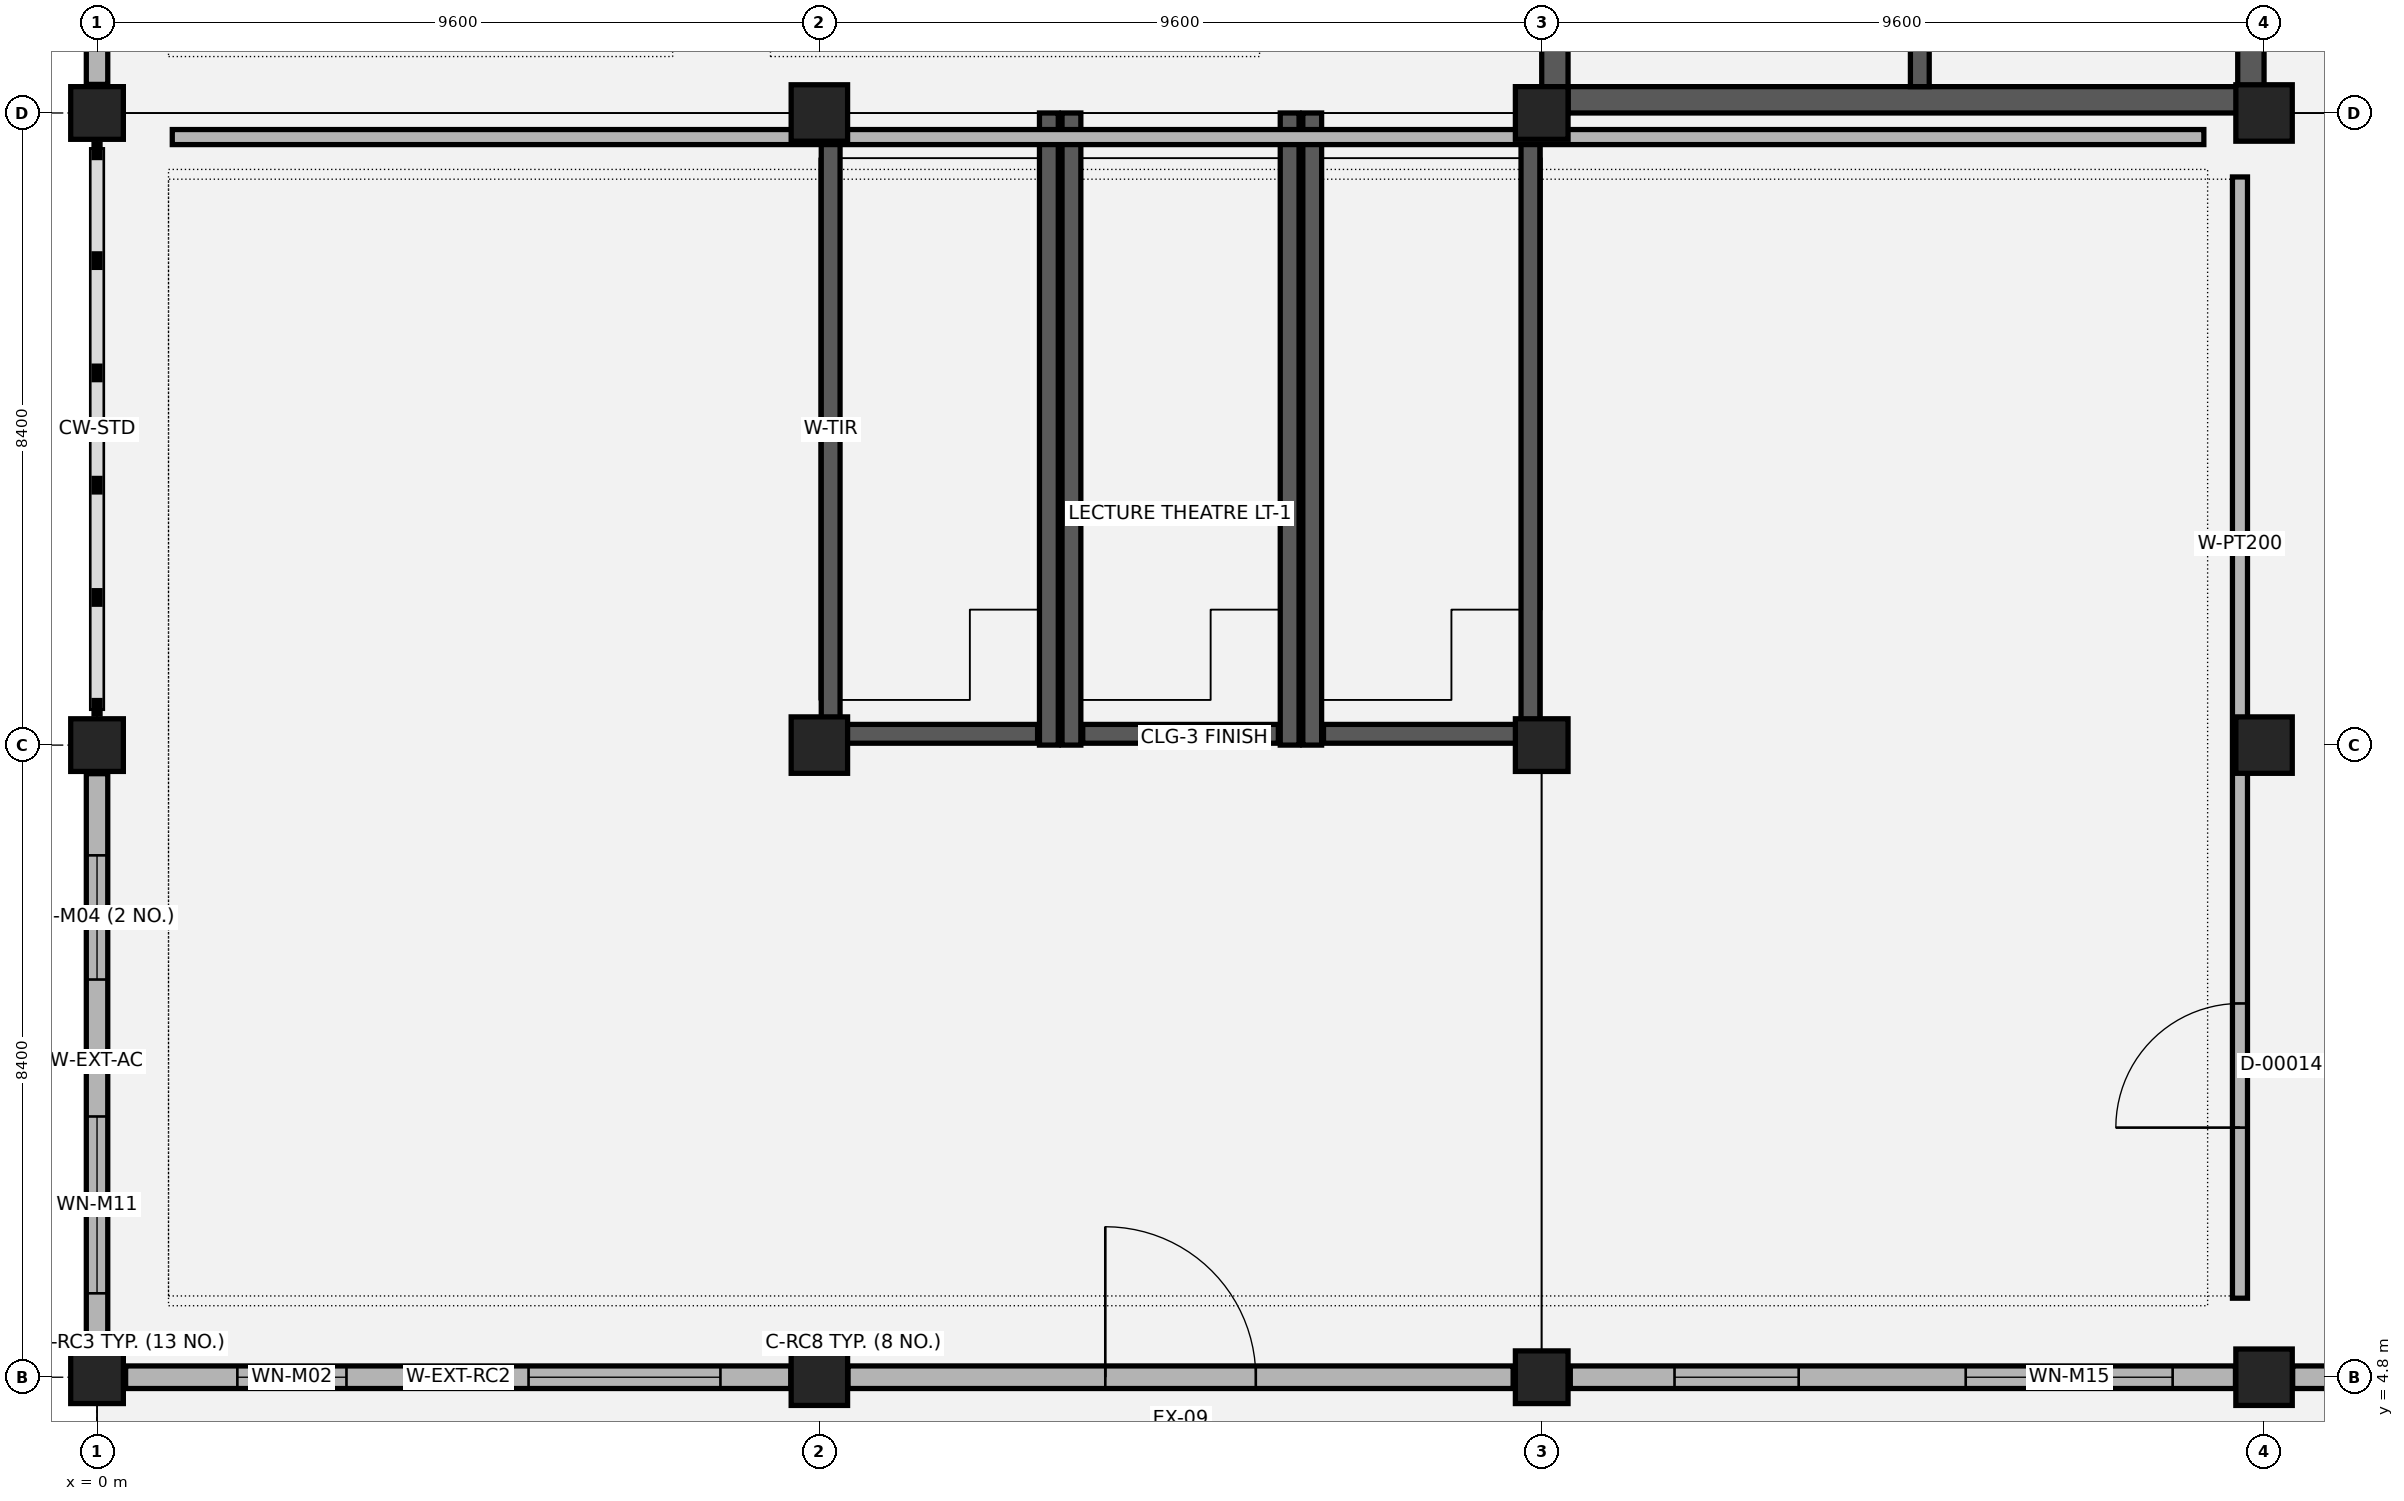
"""IFC4 building model, lengths in metres.
Left out: names, types, materials, properties, quantities, classifications, styles, units other than length and angle.
Written with IfcOpenShell. Run it as: python <this file> out.ifc"""

import sys

from ifc_helpers import new_model, si_unit, direction, frame, frame_2d, origin, origin_2d, place, context, subcontext, project, spatial, rectangle, extrude, element, fill, save


model = new_model("IFC4")
c1 = context("Model", 3, precision=1e-05, world=origin(), true_north=direction((0.0, 1.0)))
c2 = subcontext(c1, "Body", "Model", "MODEL_VIEW")
j1 = project(units=[si_unit("LENGTHUNIT", "METRE"), si_unit("PLANEANGLEUNIT", "RADIAN")], contexts=[c1])
p1 = place(None, origin())
s1 = spatial("IfcSite", under=j1, at=p1, CompositionType="ELEMENT")
p2 = place(p1, origin())
s2 = spatial("IfcBuilding", under=s1, at=p2, CompositionType="ELEMENT")
p3 = place(p2, origin())
s3 = spatial("IfcBuildingStorey", under=s2, at=p3, CompositionType="ELEMENT", Elevation=0.0)
for number, where, z_axis, x_axis in (
    (1, (0.0, 4.8, 0.0), (0.0, 0.0, 1.0), (1.0, 0.0, 0.0)),
    (2, (0.0, 13.2, 0.0), (0.0, 0.0, 1.0), (1.0, 0.0, 0.0)),
    (3, (0.0, 21.6, 0.0), (0.0, 0.0, 1.0), (1.0, 0.0, 0.0)),
):
    element("IfcColumn", number, at=place(p3, frame(where, z_axis=z_axis, x_axis=x_axis)), inside=s3, PredefinedType="COLUMN", context=c2, shape_type="SweptSolid", body=[
        extrude(rectangle(XDim=0.7, YDim=0.7, at=origin_2d()), origin(), (0.0, 0.0, 1.0), 5.4),
    ])
for number, where, z_axis, x_axis in (
    (4, (9.6, 4.8, 0.0), (0.0, 0.0, 1.0), (1.0, 0.0, 0.0)),
    (5, (9.6, 13.2, 0.0), (0.0, 0.0, 1.0), (1.0, 0.0, 0.0)),
    (6, (9.6, 21.6, 0.0), (0.0, 0.0, 1.0), (1.0, 0.0, 0.0)),
):
    element("IfcColumn", number, at=place(p3, frame(where, z_axis=z_axis, x_axis=x_axis)), inside=s3, PredefinedType="COLUMN", context=c2, shape_type="SweptSolid", body=[
        extrude(rectangle(XDim=0.75, YDim=0.75, at=origin_2d()), origin(), (0.0, 0.0, 1.0), 5.4),
    ])
for number, where, z_axis, x_axis in (
    (7, (19.2, 4.8, 0.0), (0.0, 0.0, 1.0), (1.0, 0.0, 0.0)),
    (8, (19.2, 13.2, 0.0), (0.0, 0.0, 1.0), (1.0, 0.0, 0.0)),
    (9, (19.2, 21.6, 0.0), (0.0, 0.0, 1.0), (1.0, 0.0, 0.0)),
):
    element("IfcColumn", number, at=place(p3, frame(where, z_axis=z_axis, x_axis=x_axis)), inside=s3, PredefinedType="COLUMN", context=c2, shape_type="SweptSolid", body=[
        extrude(rectangle(XDim=0.7, YDim=0.7, at=origin_2d()), origin(), (0.0, 0.0, 1.0), 5.4),
    ])
for number, where, z_axis, x_axis in (
    (10, (28.8, 4.8, 0.0), (0.0, 0.0, 1.0), (1.0, 0.0, 0.0)),
    (11, (28.8, 13.2, 0.0), (0.0, 0.0, 1.0), (1.0, 0.0, 0.0)),
    (12, (28.8, 21.6, 0.0), (0.0, 0.0, 1.0), (1.0, 0.0, 0.0)),
):
    element("IfcColumn", number, at=place(p3, frame(where, z_axis=z_axis, x_axis=x_axis)), inside=s3, PredefinedType="COLUMN", context=c2, shape_type="SweptSolid", body=[
        extrude(rectangle(XDim=0.75, YDim=0.75, at=origin_2d()), origin(), (0.0, 0.0, 1.0), 5.4),
    ])
for number, where, z_axis, x_axis in (
    (13, (9.75, 13.2, 0.0), (0.0, 0.0, 1.0), (0.0, 1.0, 0.0)),
    (14, (12.65, 13.2, 0.0), (0.0, 0.0, 1.0), (0.0, 1.0, 0.0)),
):
    element("IfcWall", number, at=place(p3, frame(where, z_axis=z_axis, x_axis=x_axis)), inside=s3, PredefinedType="SHEAR", context=c2, shape_type="SweptSolid", body=[
        extrude(rectangle(XDim=8.4, YDim=0.25, at=frame_2d((4.2, 0.0))), origin(), (0.0, 0.0, 1.0), 0.4),
    ])
p4 = place(p3, frame((9.9, 13.35, 0.0), z_axis=(0.0, 0.0, 1.0), x_axis=(1.0, 0.0, 0.0)))
e15 = element("IfcWall", 15, at=p4, inside=s3, PredefinedType="SHEAR", context=c2, shape_type="SweptSolid", body=[
    extrude(rectangle(XDim=2.6, YDim=0.25, at=frame_2d((1.3, 0.0))), origin(), (0.0, 0.0, 1.0), 0.4),
])
for number, where, z_axis, x_axis in (
    (16, (12.95, 13.2, 0.0), (0.0, 0.0, 1.0), (0.0, 1.0, 0.0)),
    (17, (15.85, 13.2, 0.0), (0.0, 0.0, 1.0), (0.0, 1.0, 0.0)),
):
    element("IfcWall", number, at=place(p3, frame(where, z_axis=z_axis, x_axis=x_axis)), inside=s3, PredefinedType="SHEAR", context=c2, shape_type="SweptSolid", body=[
        extrude(rectangle(XDim=8.4, YDim=0.25, at=frame_2d((4.2, 0.0))), origin(), (0.0, 0.0, 1.0), 1.0),
    ])
p5 = place(p3, frame((13.1, 13.35, 0.0), z_axis=(0.0, 0.0, 1.0), x_axis=(1.0, 0.0, 0.0)))
e18 = element("IfcWall", 18, at=p5, inside=s3, PredefinedType="SHEAR", context=c2, shape_type="SweptSolid", body=[
    extrude(rectangle(XDim=2.6, YDim=0.25, at=frame_2d((1.3, 0.0))), origin(), (0.0, 0.0, 1.0), 1.0),
])
for number, where, z_axis, x_axis in (
    (19, (16.15, 13.2, 0.0), (0.0, 0.0, 1.0), (0.0, 1.0, 0.0)),
    (20, (19.05, 13.2, 0.0), (0.0, 0.0, 1.0), (0.0, 1.0, 0.0)),
):
    element("IfcWall", number, at=place(p3, frame(where, z_axis=z_axis, x_axis=x_axis)), inside=s3, PredefinedType="SHEAR", context=c2, shape_type="SweptSolid", body=[
        extrude(rectangle(XDim=8.4, YDim=0.25, at=frame_2d((4.2, 0.0))), origin(), (0.0, 0.0, 1.0), 1.6),
    ])
p6 = place(p3, frame((16.3, 13.35, 0.0), z_axis=(0.0, 0.0, 1.0), x_axis=(1.0, 0.0, 0.0)))
e21 = element("IfcWall", 21, at=p6, inside=s3, PredefinedType="SHEAR", context=c2, shape_type="SweptSolid", body=[
    extrude(rectangle(XDim=2.6, YDim=0.25, at=frame_2d((1.3, 0.0))), origin(), (0.0, 0.0, 1.0), 1.6),
])
p7 = place(p3, frame((0.0, 12.82, 0.0), z_axis=(0.0, 0.0, 1.0), x_axis=(0.0, -1.0, 0.0)))
e22 = element("IfcWall", 22, at=p7, inside=s3, PredefinedType="SOLIDWALL", context=c2, shape_type="SweptSolid", body=[
    extrude(rectangle(XDim=7.64, YDim=0.285, at=frame_2d((3.82, 0.0))), origin(), (0.0, 0.0, 1.0), 4.04),
])
p8 = place(p7, frame((1.085, 0.0, 0.9)))
e23 = element("IfcOpeningElement", 23, at=p8, cuts=e22, PredefinedType="OPENING", context=c2, shape_type="SweptSolid", body=[
    extrude(rectangle(XDim=1.65, YDim=1.5, at=frame_2d((0.825, 0.75))), frame((0.0, 0.152, 0.0), z_axis=(0.0, -1.0, 0.0), x_axis=(1.0, 0.0, 0.0)), (0.0, 0.0, 1.0), 0.305),
])
p9 = place(p7, frame((4.555, 0.0, 0.9)))
e24 = element("IfcOpeningElement", 24, at=p9, cuts=e22, PredefinedType="OPENING", context=c2, shape_type="SweptSolid", body=[
    extrude(rectangle(XDim=2.35, YDim=1.7, at=frame_2d((1.175, 0.85))), frame((0.0, 0.152, 0.0), z_axis=(0.0, -1.0, 0.0), x_axis=(1.0, 0.0, 0.0)), (0.0, 0.0, 1.0), 0.305),
])
p10 = place(p3, frame((0.0, 29.62, 0.0), z_axis=(0.0, 0.0, 1.0), x_axis=(0.0, -1.0, 0.0)))
e25 = element("IfcWall", 25, at=p10, inside=s3, PredefinedType="SOLIDWALL", context=c2, shape_type="SweptSolid", body=[
    extrude(rectangle(XDim=7.64, YDim=0.285, at=frame_2d((3.82, 0.0))), origin(), (0.0, 0.0, 1.0), 4.04),
])
p11 = place(p10, frame((2.82, 0.0, 0.0)))
e26 = element("IfcOpeningElement", 26, at=p11, cuts=e25, PredefinedType="OPENING", context=c2, shape_type="SweptSolid", body=[
    extrude(rectangle(XDim=2.0, YDim=2.2, at=frame_2d((1.0, 1.1))), frame((0.0, 0.152, 0.0), z_axis=(0.0, -1.0, 0.0), x_axis=(1.0, 0.0, 0.0)), (0.0, 0.0, 1.0), 0.305),
])
p12 = place(p3, frame((0.38, 4.8, 0.0), z_axis=(0.0, 0.0, 1.0), x_axis=(1.0, 0.0, 0.0)))
e27 = element("IfcWall", 27, at=p12, inside=s3, PredefinedType="SOLIDWALL", context=c2, shape_type="SweptSolid", body=[
    extrude(rectangle(XDim=8.84, YDim=0.3, at=frame_2d((4.42, 0.0))), origin(), (0.0, 0.0, 1.0), 4.04),
])
p13 = place(p12, frame((1.485, 0.0, 0.9)))
e28 = element("IfcOpeningElement", 28, at=p13, cuts=e27, PredefinedType="OPENING", context=c2, shape_type="SweptSolid", body=[
    extrude(rectangle(XDim=1.45, YDim=1.45, at=frame_2d((0.725, 0.725))), frame((0.0, 0.16, 0.0), z_axis=(0.0, -1.0, 0.0), x_axis=(1.0, 0.0, 0.0)), (0.0, 0.0, 1.0), 0.32),
])
p14 = place(p12, frame((5.355, 0.0, 0.9)))
e29 = element("IfcOpeningElement", 29, at=p14, cuts=e27, PredefinedType="OPENING", context=c2, shape_type="SweptSolid", body=[
    extrude(rectangle(XDim=2.55, YDim=1.75, at=frame_2d((1.275, 0.875))), frame((0.0, 0.16, 0.0), z_axis=(0.0, -1.0, 0.0), x_axis=(1.0, 0.0, 0.0)), (0.0, 0.0, 1.0), 0.32),
])
p15 = place(p3, frame((9.98, 4.8, 0.0), z_axis=(0.0, 0.0, 1.0), x_axis=(1.0, 0.0, 0.0)))
e30 = element("IfcWall", 30, at=p15, inside=s3, PredefinedType="SOLIDWALL", context=c2, shape_type="SweptSolid", body=[
    extrude(rectangle(XDim=8.84, YDim=0.3, at=frame_2d((4.42, 0.0))), origin(), (0.0, 0.0, 1.0), 4.04),
])
p16 = place(p15, frame((3.42, 0.0, 0.0)))
e31 = element("IfcOpeningElement", 31, at=p16, cuts=e30, PredefinedType="OPENING", context=c2, shape_type="SweptSolid", body=[
    extrude(rectangle(XDim=2.0, YDim=2.2, at=frame_2d((1.0, 1.1))), frame((0.0, 0.16, 0.0), z_axis=(0.0, -1.0, 0.0), x_axis=(1.0, 0.0, 0.0)), (0.0, 0.0, 1.0), 0.32),
])
p17 = place(p3, frame((19.58, 4.8, 0.0), z_axis=(0.0, 0.0, 1.0), x_axis=(1.0, 0.0, 0.0)))
e32 = element("IfcWall", 32, at=p17, inside=s3, PredefinedType="SOLIDWALL", context=c2, shape_type="SweptSolid", body=[
    extrude(rectangle(XDim=8.84, YDim=0.3, at=frame_2d((4.42, 0.0))), origin(), (0.0, 0.0, 1.0), 4.04),
])
p18 = place(p17, frame((1.385, 0.0, 0.9)))
e33 = element("IfcOpeningElement", 33, at=p18, cuts=e32, PredefinedType="OPENING", context=c2, shape_type="SweptSolid", body=[
    extrude(rectangle(XDim=1.65, YDim=1.5, at=frame_2d((0.825, 0.75))), frame((0.0, 0.16, 0.0), z_axis=(0.0, -1.0, 0.0), x_axis=(1.0, 0.0, 0.0)), (0.0, 0.0, 1.0), 0.32),
])
p19 = place(p17, frame((5.255, 0.0, 0.9)))
e34 = element("IfcOpeningElement", 34, at=p19, cuts=e32, PredefinedType="OPENING", context=c2, shape_type="SweptSolid", body=[
    extrude(rectangle(XDim=2.75, YDim=1.8, at=frame_2d((1.375, 0.9))), frame((0.0, 0.16, 0.0), z_axis=(0.0, -1.0, 0.0), x_axis=(1.0, 0.0, 0.0)), (0.0, 0.0, 1.0), 0.32),
])
p20 = place(p3, frame((29.18, 4.8, 0.0), z_axis=(0.0, 0.0, 1.0), x_axis=(1.0, 0.0, 0.0)))
e35 = element("IfcWall", 35, at=p20, inside=s3, PredefinedType="SOLIDWALL", context=c2, shape_type="SweptSolid", body=[
    extrude(rectangle(XDim=8.84, YDim=0.3, at=frame_2d((4.42, 0.0))), origin(), (0.0, 0.0, 1.0), 4.04),
])
p21 = place(p20, frame((3.37, 0.0, 0.0)))
e36 = element("IfcOpeningElement", 36, at=p21, cuts=e35, PredefinedType="OPENING", context=c2, shape_type="SweptSolid", body=[
    extrude(rectangle(XDim=2.1, YDim=2.2, at=frame_2d((1.05, 1.1))), frame((0.0, 0.16, 0.0), z_axis=(0.0, -1.0, 0.0), x_axis=(1.0, 0.0, 0.0)), (0.0, 0.0, 1.0), 0.32),
])
p22 = place(p3, frame((19.2, 21.775, 0.0), z_axis=(0.0, 0.0, 1.0), x_axis=(1.0, 0.0, 0.0)))
e37 = element("IfcWall", 37, at=p22, inside=s3, PredefinedType="SHEAR", context=c2, shape_type="SweptSolid", body=[
    extrude(rectangle(XDim=9.6, YDim=0.35, at=frame_2d((4.8, 0.0))), origin(), (0.0, 0.0, 1.0), 5.11),
])
p23 = place(p3, frame((19.375, 21.6, 0.0), z_axis=(0.0, 0.0, 1.0), x_axis=(0.0, 1.0, 0.0)))
e38 = element("IfcWall", 38, at=p23, inside=s3, PredefinedType="SHEAR", context=c2, shape_type="SweptSolid", body=[
    extrude(rectangle(XDim=8.4, YDim=0.35, at=frame_2d((4.2, 0.0))), origin(), (0.0, 0.0, 1.0), 5.11),
])
p24 = place(p3, frame((28.625, 21.6, 0.0), z_axis=(0.0, 0.0, 1.0), x_axis=(0.0, 1.0, 0.0)))
e39 = element("IfcWall", 39, at=p24, inside=s3, PredefinedType="SHEAR", context=c2, shape_type="SweptSolid", body=[
    extrude(rectangle(XDim=8.4, YDim=0.35, at=frame_2d((4.2, 0.0))), origin(), (0.0, 0.0, 1.0), 5.11),
])
p25 = place(p24, frame((5.3, 0.0, 0.0)))
e40 = element("IfcOpeningElement", 40, at=p25, cuts=e39, PredefinedType="OPENING", context=c2, shape_type="SweptSolid", body=[
    extrude(rectangle(XDim=1.4, YDim=2.15, at=frame_2d((0.7, 1.075))), frame((0.0, 0.185, 0.0), z_axis=(0.0, -1.0, 0.0), x_axis=(1.0, 0.0, 0.0)), (0.0, 0.0, 1.0), 0.37),
])
p26 = place(p3, frame((24.225, 29.65, 0.0), z_axis=(0.0, 0.0, 1.0), x_axis=(0.0, -1.0, 0.0)))
e41 = element("IfcWall", 41, at=p26, inside=s3, PredefinedType="SHEAR", context=c2, shape_type="SweptSolid", body=[
    extrude(rectangle(XDim=7.7, YDim=0.25, at=frame_2d((3.85, 0.0))), origin(), (0.0, 0.0, 1.0), 5.11),
])
p27 = place(p26, frame((0.45, 0.0, 0.0)))
e42 = element("IfcOpeningElement", 42, at=p27, cuts=e41, PredefinedType="OPENING", context=c2, shape_type="SweptSolid", body=[
    extrude(rectangle(XDim=1.25, YDim=2.15, at=frame_2d((0.625, 1.075))), frame((0.0, 0.135, 0.0), z_axis=(0.0, -1.0, 0.0), x_axis=(1.0, 0.0, 0.0)), (0.0, 0.0, 1.0), 0.27),
])
p28 = place(p3, frame((28.48, 5.85, 0.0), z_axis=(0.0, 0.0, 1.0), x_axis=(0.0, 1.0, 0.0)))
e43 = element("IfcWall", 43, at=p28, inside=s3, PredefinedType="PARTITIONING", context=c2, shape_type="SweptSolid", body=[
    extrude(rectangle(XDim=14.9, YDim=0.2, at=frame_2d((7.45, 0.0))), origin(), (0.0, 0.0, 1.0), 4.04),
])
p29 = place(p28, frame((2.267, 0.0, 0.0)))
e44 = element("IfcOpeningElement", 44, at=p29, cuts=e43, PredefinedType="OPENING", context=c2, shape_type="SweptSolid", body=[
    extrude(rectangle(XDim=1.65, YDim=2.15, at=frame_2d((0.825, 1.075))), frame((0.0, 0.11, 0.0), z_axis=(0.0, -1.0, 0.0), x_axis=(1.0, 0.0, 0.0)), (0.0, 0.0, 1.0), 0.22),
])
p30 = place(p3, frame((1.0, 21.28, 0.0), z_axis=(0.0, 0.0, 1.0), x_axis=(1.0, 0.0, 0.0)))
e45 = element("IfcWall", 45, at=p30, inside=s3, PredefinedType="PARTITIONING", context=c2, shape_type="SweptSolid", body=[
    extrude(rectangle(XDim=27.0, YDim=0.2, at=frame_2d((13.5, 0.0))), origin(), (0.0, 0.0, 1.0), 4.04),
])
p31 = place(p8, origin())
e46 = element("IfcWindow", 46, at=p31, inside=s3, PartitioningType="SINGLE_PANEL", PredefinedType="WINDOW", context=c2, shape_type="SweptSolid", body=[
    extrude(rectangle(XDim=1.65, YDim=1.5, at=frame_2d((0.825, 0.75))), frame((0.0, 0.03, 0.0), z_axis=(0.0, -1.0, 0.0), x_axis=(1.0, 0.0, 0.0)), (0.0, 0.0, 1.0), 0.06),
])
fill(e23, e46)
p32 = place(p9, origin())
e47 = element("IfcWindow", 47, at=p32, inside=s3, PartitioningType="SINGLE_PANEL", PredefinedType="WINDOW", context=c2, shape_type="SweptSolid", body=[
    extrude(rectangle(XDim=2.35, YDim=1.7, at=frame_2d((1.175, 0.85))), frame((0.0, 0.03, 0.0), z_axis=(0.0, -1.0, 0.0), x_axis=(1.0, 0.0, 0.0)), (0.0, 0.0, 1.0), 0.06),
])
fill(e24, e47)
p33 = place(p13, origin())
e48 = element("IfcWindow", 48, at=p33, inside=s3, PartitioningType="SINGLE_PANEL", PredefinedType="WINDOW", context=c2, shape_type="SweptSolid", body=[
    extrude(rectangle(XDim=1.45, YDim=1.45, at=frame_2d((0.725, 0.725))), frame((0.0, 0.03, 0.0), z_axis=(0.0, -1.0, 0.0), x_axis=(1.0, 0.0, 0.0)), (0.0, 0.0, 1.0), 0.06),
])
fill(e28, e48)
p34 = place(p14, origin())
e49 = element("IfcWindow", 49, at=p34, inside=s3, PartitioningType="SINGLE_PANEL", PredefinedType="WINDOW", context=c2, shape_type="SweptSolid", body=[
    extrude(rectangle(XDim=2.55, YDim=1.75, at=frame_2d((1.275, 0.875))), frame((0.0, 0.03, 0.0), z_axis=(0.0, -1.0, 0.0), x_axis=(1.0, 0.0, 0.0)), (0.0, 0.0, 1.0), 0.06),
])
fill(e29, e49)
p35 = place(p16, origin())
e50 = element("IfcDoor", 50, at=p35, inside=s3, OperationType="SINGLE_SWING_LEFT", PredefinedType="DOOR", context=c2, shape_type="SweptSolid", body=[
    extrude(rectangle(XDim=2.0, YDim=2.2, at=frame_2d((1.0, 1.1))), frame((0.0, 0.025, 0.0), z_axis=(0.0, -1.0, 0.0), x_axis=(1.0, 0.0, 0.0)), (0.0, 0.0, 1.0), 0.05),
])
fill(e31, e50)
p36 = place(p18, origin())
e51 = element("IfcWindow", 51, at=p36, inside=s3, PartitioningType="SINGLE_PANEL", PredefinedType="WINDOW", context=c2, shape_type="SweptSolid", body=[
    extrude(rectangle(XDim=1.65, YDim=1.5, at=frame_2d((0.825, 0.75))), frame((0.0, 0.03, 0.0), z_axis=(0.0, -1.0, 0.0), x_axis=(1.0, 0.0, 0.0)), (0.0, 0.0, 1.0), 0.06),
])
fill(e33, e51)
p37 = place(p19, origin())
e52 = element("IfcWindow", 52, at=p37, inside=s3, PartitioningType="SINGLE_PANEL", PredefinedType="WINDOW", context=c2, shape_type="SweptSolid", body=[
    extrude(rectangle(XDim=2.75, YDim=1.8, at=frame_2d((1.375, 0.9))), frame((0.0, 0.03, 0.0), z_axis=(0.0, -1.0, 0.0), x_axis=(1.0, 0.0, 0.0)), (0.0, 0.0, 1.0), 0.06),
])
fill(e34, e52)
p38 = place(p29, origin())
e53 = element("IfcDoor", 53, at=p38, inside=s3, OperationType="SINGLE_SWING_LEFT", PredefinedType="DOOR", context=c2, shape_type="SweptSolid", body=[
    extrude(rectangle(XDim=1.65, YDim=2.15, at=frame_2d((0.825, 1.075))), frame((0.0, 0.025, 0.0), z_axis=(0.0, -1.0, 0.0), x_axis=(1.0, 0.0, 0.0)), (0.0, 0.0, 1.0), 0.05),
])
fill(e44, e53)
save(model, sys.argv[1])
